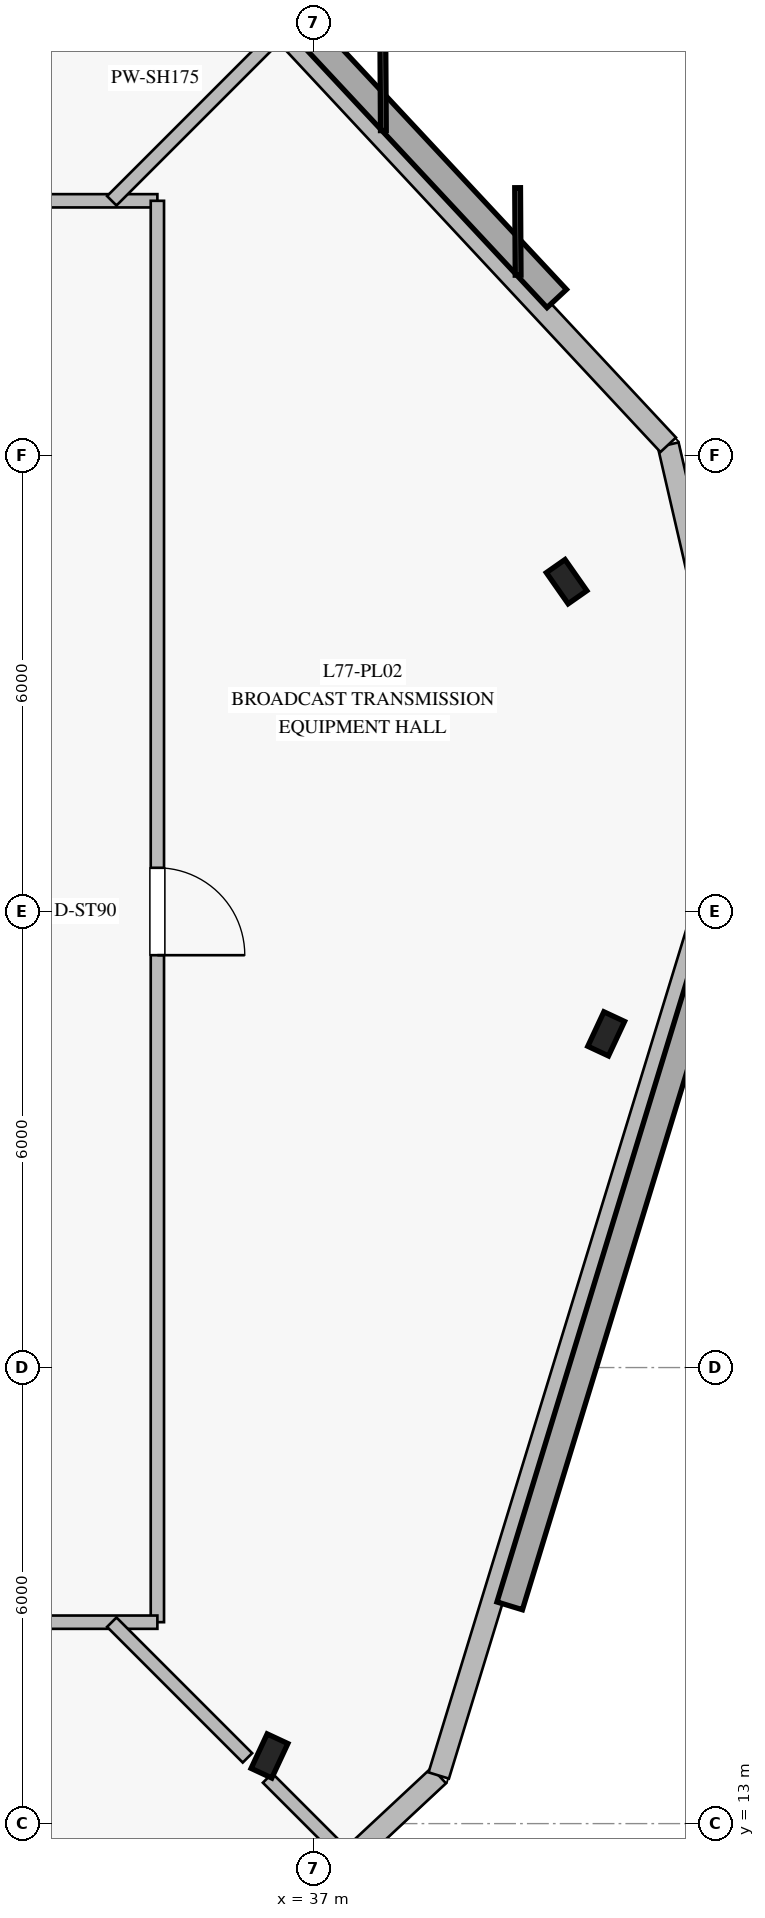
"""IFC4 building model, lengths in metres.
Left out: names, types, materials, properties, quantities, classifications, styles, units other than length and angle.
Written with IfcOpenShell. Run it as: python <this file> out.ifc"""

import sys

from ifc_helpers import new_model, si_unit, direction, frame, frame_2d, origin, origin_2d, place, context, subcontext, project, spatial, rectangle, i_section, extrude, element, fill, save


model = new_model("IFC4")
c1 = context("Model", 3, precision=1e-05, world=origin(), true_north=direction((0.0, 1.0)))
c2 = subcontext(c1, "Body", "Model", "MODEL_VIEW")
j1 = project(units=[si_unit("LENGTHUNIT", "METRE"), si_unit("PLANEANGLEUNIT", "RADIAN")], contexts=[c1])
p1 = place(None, origin())
s1 = spatial("IfcSite", under=j1, at=p1, CompositionType="ELEMENT")
p2 = place(p1, origin())
s2 = spatial("IfcBuilding", under=s1, at=p2, CompositionType="ELEMENT")
p3 = place(p2, frame((0.0, 0.0, 318.2)))
s3 = spatial("IfcBuildingStorey", under=s2, at=p3, CompositionType="ELEMENT", Elevation=318.2)
for number, where, z_axis, x_axis in (
    (1, (36.425, 13.89, 0.0), (0.0, 0.0, 1.0), (0.423, 0.906, 0.0)),
    (2, (40.855, 23.39, 0.0), (0.0, 0.0, 1.0), (0.423, 0.906, 0.0)),
    (3, (40.334, 29.339, 0.0), (0.0, 0.0, 1.0), (-0.574, 0.819, 0.0)),
):
    element("IfcColumn", number, at=place(p3, frame(where, z_axis=z_axis, x_axis=x_axis)), inside=s3, PredefinedType="COLUMN", context=c2, shape_type="SweptSolid", body=[
        extrude(i_section(OverallWidth=0.3, OverallDepth=0.5, WebThickness=0.014, FlangeThickness=0.028, at=origin_2d()), origin(), (0.0, 0.0, 1.0), 4.4),
    ])
p4 = place(p3, frame((35.387, 10.588, 0.0), z_axis=(0.0, 0.0, 1.0), x_axis=(0.731311609652, 0.682043495378, 0.0)))
e4 = element("IfcWall", 4, at=p4, inside=s3, PredefinedType="STANDARD", context=c2, shape_type="SweptSolid", body=[
    extrude(rectangle(XDim=4.465, YDim=0.28, at=frame_2d((2.232, 0.0))), origin(), (0.0, 0.0, 1.0), 4.14),
])
p5 = place(p3, frame((38.652, 13.633, 0.0), z_axis=(0.0, 0.0, 1.0), x_axis=(0.292402016217, 0.956295488284, 0.0)))
e5 = element("IfcWall", 5, at=p5, inside=s3, PredefinedType="STANDARD", context=c2, shape_type="SweptSolid", body=[
    extrude(rectangle(XDim=13.758, YDim=0.28, at=frame_2d((6.879, 0.0))), origin(), (0.0, 0.0, 1.0), 4.14),
])
p6 = place(p3, frame((42.675, 26.79, 0.0), z_axis=(0.0, 0.0, 1.0), x_axis=(-0.22493139919, 0.974374602326, 0.0)))
e6 = element("IfcWall", 6, at=p6, inside=s3, PredefinedType="STANDARD", context=c2, shape_type="SweptSolid", body=[
    extrude(rectangle(XDim=4.464, YDim=0.28, at=frame_2d((2.232, 0.0))), origin(), (0.0, 0.0, 1.0), 4.14),
])
p7 = place(p3, frame((41.671, 31.14, 0.0), z_axis=(0.0, 0.0, 1.0), x_axis=(-0.682027341853, 0.731326674588, 0.0)))
e7 = element("IfcWall", 7, at=p7, inside=s3, PredefinedType="STANDARD", context=c2, shape_type="SweptSolid", body=[
    extrude(rectangle(XDim=13.757, YDim=0.28, at=frame_2d((6.879, 0.0))), origin(), (0.0, 0.0, 1.0), 4.14),
])
p8 = place(p3, frame((15.05, 34.35, 0.0), z_axis=(0.0, 0.0, 1.0), x_axis=(1.0, 0.0, 0.0)))
e8 = element("IfcWall", 8, at=p8, inside=s3, PredefinedType="PARTITIONING", context=c2, shape_type="SweptSolid", body=[
    extrude(rectangle(XDim=19.9, YDim=0.175, at=frame_2d((9.95, 0.0))), origin(), (0.0, 0.0, 1.0), 3.64),
])
p9 = place(p8, frame((9.285, 0.0, 0.0)))
e9 = element("IfcOpeningElement", 9, at=p9, cuts=e8, PredefinedType="OPENING", context=c2, shape_type="SweptSolid", body=[
    extrude(rectangle(XDim=1.15, YDim=2.2, at=frame_2d((0.575, 1.1))), frame((0.0, 0.098, 0.0), z_axis=(0.0, -1.0, 0.0), x_axis=(1.0, 0.0, 0.0)), (0.0, 0.0, 1.0), 0.195),
])
p10 = place(p3, frame((34.95, 34.35, 0.0), z_axis=(0.0, 0.0, 1.0), x_axis=(0.0, -1.0, 0.0)))
e10 = element("IfcWall", 10, at=p10, inside=s3, PredefinedType="PARTITIONING", context=c2, shape_type="SweptSolid", body=[
    extrude(rectangle(XDim=18.7, YDim=0.175, at=frame_2d((9.35, 0.0))), origin(), (0.0, 0.0, 1.0), 3.64),
])
p11 = place(p10, frame((8.775, 0.0, 0.0)))
e11 = element("IfcOpeningElement", 11, at=p11, cuts=e10, PredefinedType="OPENING", context=c2, shape_type="SweptSolid", body=[
    extrude(rectangle(XDim=1.15, YDim=2.2, at=frame_2d((0.575, 1.1))), frame((0.0, 0.098, 0.0), z_axis=(0.0, -1.0, 0.0), x_axis=(1.0, 0.0, 0.0)), (0.0, 0.0, 1.0), 0.195),
])
p12 = place(p3, frame((34.95, 15.65, 0.0), z_axis=(0.0, 0.0, 1.0), x_axis=(-1.0, 0.0, 0.0)))
e12 = element("IfcWall", 12, at=p12, inside=s3, PredefinedType="PARTITIONING", context=c2, shape_type="SweptSolid", body=[
    extrude(rectangle(XDim=19.9, YDim=0.175, at=frame_2d((9.95, 0.0))), origin(), (0.0, 0.0, 1.0), 3.64),
])
p13 = place(p12, frame((9.285, 0.0, 0.0)))
e13 = element("IfcOpeningElement", 13, at=p13, cuts=e12, PredefinedType="OPENING", context=c2, shape_type="SweptSolid", body=[
    extrude(rectangle(XDim=1.15, YDim=2.2, at=frame_2d((0.575, 1.1))), frame((0.0, 0.098, 0.0), z_axis=(0.0, -1.0, 0.0), x_axis=(1.0, 0.0, 0.0)), (0.0, 0.0, 1.0), 0.195),
])
p14 = place(p3, frame((34.35, 34.35, 0.0), z_axis=(0.0, 0.0, 1.0), x_axis=(0.707106781187, 0.707106781187, 0.0)))
e14 = element("IfcWall", 14, at=p14, inside=s3, PredefinedType="PARTITIONING", context=c2, shape_type="SweptSolid", body=[
    extrude(rectangle(XDim=3.096, YDim=0.175, at=frame_2d((1.548, 0.0))), origin(), (0.0, 0.0, 1.0), 3.64),
])
p15 = place(p3, frame((34.35, 15.65, 0.0), z_axis=(0.0, 0.0, 1.0), x_axis=(0.707106781187, -0.707106781187, 0.0)))
e15 = element("IfcWall", 15, at=p15, inside=s3, PredefinedType="PARTITIONING", context=c2, shape_type="SweptSolid", body=[
    extrude(rectangle(XDim=2.524, YDim=0.175, at=frame_2d((1.262, 0.0))), origin(), (0.0, 0.0, 1.0), 3.64),
])
p16 = place(p3, frame((36.4, 13.6, 0.0), z_axis=(0.0, 0.0, 1.0), x_axis=(0.707106781187, -0.707106781187, 0.0)))
e16 = element("IfcWall", 16, at=p16, inside=s3, PredefinedType="PARTITIONING", context=c2, shape_type="SweptSolid", body=[
    extrude(rectangle(XDim=1.453, YDim=0.175, at=frame_2d((0.726, 0.0))), origin(), (0.0, 0.0, 1.0), 3.64),
])
p17 = place(p11, origin())
e17 = element("IfcDoor", 17, at=p17, inside=s3, OperationType="SINGLE_SWING_RIGHT", PredefinedType="DOOR", context=c2, shape_type="SweptSolid", body=[
    extrude(rectangle(XDim=1.15, YDim=2.2, at=frame_2d((0.575, 1.1))), frame((0.0, 0.025, 0.0), z_axis=(0.0, -1.0, 0.0), x_axis=(1.0, 0.0, 0.0)), (0.0, 0.0, 1.0), 0.05),
])
fill(e11, e17)
save(model, sys.argv[1])
